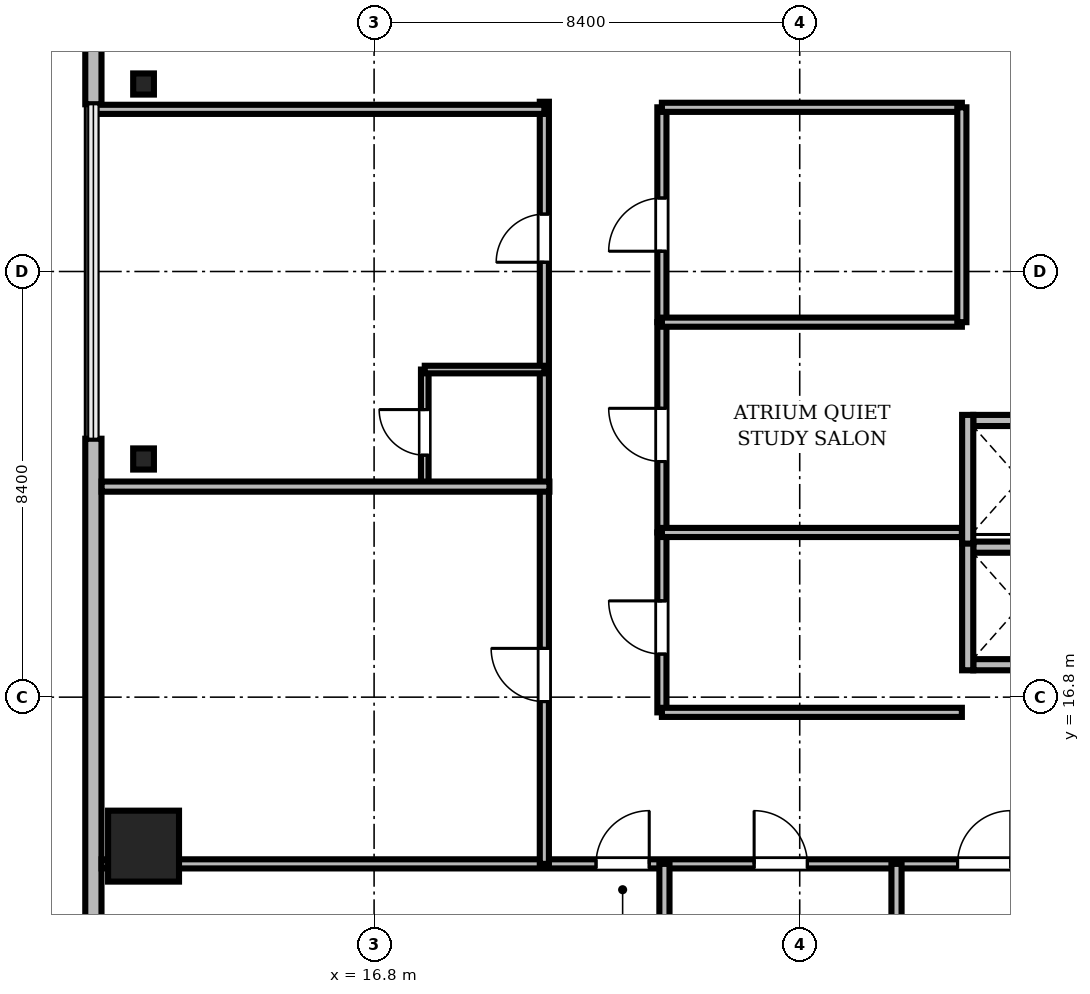
"""IFC4 building model, lengths in metres.
Left out: names, types, materials, properties, quantities, classifications, styles, units other than length and angle.
Written with IfcOpenShell. Run it as: python <this file> out.ifc"""

import sys

from ifc_helpers import new_model, si_unit, direction, frame, frame_2d, origin, origin_2d, place, context, subcontext, project, spatial, rectangle, i_section, extrude, source, transform, mapped, element, fill, save


model = new_model("IFC4")
c1 = context("Model", 3, precision=1e-05, world=origin(), true_north=direction((0.0, 1.0)))
c2 = subcontext(c1, "Body", "Model", "MODEL_VIEW")
j1 = project(units=[si_unit("LENGTHUNIT", "METRE"), si_unit("PLANEANGLEUNIT", "RADIAN")], contexts=[c1])
p1 = place(None, origin())
s1 = spatial("IfcSite", under=j1, at=p1, CompositionType="ELEMENT")
p2 = place(p1, origin())
s2 = spatial("IfcBuilding", under=s1, at=p2, CompositionType="ELEMENT")
p3 = place(p2, frame((0.0, 0.0, 184.8)))
s3 = spatial("IfcBuildingStorey", under=s2, at=p3, CompositionType="ELEMENT", Elevation=184.8)
m1 = source(origin(), c2, "Body", "SweptSolid", [
    extrude(rectangle(XDim=1.4, YDim=1.4, at=origin_2d()), origin(), (0.0, 0.0, 1.0), 3.53),
])
p4 = place(p3, frame((12.25, 13.86, 0.0), z_axis=(0.0, 0.0, 1.0), x_axis=(1.0, 0.0, 0.0)))
e1 = element("IfcColumn", 1, at=p4, inside=s3, PredefinedType="COLUMN", context=c2, shape_type="MappedRepresentation", body=[
    mapped(m1, transform((0.0, 0.0, 0.0), scale=1.0)),
])
m2 = source(origin(), c2, "Body", "SweptSolid", [
    extrude(i_section(OverallWidth=0.409, OverallDepth=0.417, WebThickness=0.021, FlangeThickness=0.033, FilletRadius=0.015, at=origin_2d()), origin(), (0.0, 0.0, 1.0), 3.53),
])
for number, where, z_axis, x_axis in (
    (2, (12.25, 28.9, 0.0), (0.0, 0.0, 1.0), (1.0, 0.0, 0.0)),
    (3, (12.25, 21.5, 0.0), (0.0, 0.0, 1.0), (1.0, 0.0, 0.0)),
):
    element("IfcColumn", number, at=place(p3, frame(where, z_axis=z_axis, x_axis=x_axis)), inside=s3, PredefinedType="COLUMN", context=c2, shape_type="MappedRepresentation", body=[
        mapped(m2, transform((0.0, 0.0, 0.0), scale=1.0)),
    ])
m3 = source(origin(), c2, "Body", "SweptSolid", [
    extrude(rectangle(XDim=15.6, YDim=0.32, at=frame_2d((7.8, 0.0))), origin(), (0.0, 0.0, 1.0), 3.53),
])
p5 = place(p3, frame((11.26, 44.1, 0.0), z_axis=(0.0, 0.0, 1.0), x_axis=(0.0, -1.0, 0.0)))
e4 = element("IfcWall", 4, at=p5, inside=s3, PredefinedType="SOLIDWALL", context=c2, shape_type="MappedRepresentation", body=[
    mapped(m3, transform((0.0, 0.0, 0.0), scale=1.0)),
])
m4 = source(origin(), c2, "Body", "SweptSolid", [
    extrude(rectangle(XDim=1.4, YDim=2.3, at=frame_2d((0.7, 1.15))), frame((0.0, 0.17, 0.0), z_axis=(0.0, -1.0, 0.0), x_axis=(1.0, 0.0, 0.0)), (0.0, 0.0, 1.0), 0.34),
])
p6 = place(p5, frame((9.61, 0.0, 0.0)))
e5 = element("IfcOpeningElement", 5, at=p6, cuts=e4, PredefinedType="OPENING", context=c2, shape_type="MappedRepresentation", body=[
    mapped(m4, transform((0.0, 0.0, 0.0), scale=1.0)),
])
m5 = source(origin(), c2, "Body", "SweptSolid", [
    extrude(rectangle(XDim=2.2, YDim=2.4, at=frame_2d((1.1, 1.2))), frame((0.0, 0.17, 0.0), z_axis=(0.0, -1.0, 0.0), x_axis=(1.0, 0.0, 0.0)), (0.0, 0.0, 1.0), 0.34),
])
p7 = place(p5, frame((3.005, 0.0, 0.72)))
e6 = element("IfcOpeningElement", 6, at=p7, cuts=e4, PredefinedType="OPENING", context=c2, shape_type="MappedRepresentation", body=[
    mapped(m5, transform((0.0, 0.0, 0.0), scale=1.0)),
])
m6 = source(origin(), c2, "Body", "SweptSolid", [
    extrude(rectangle(XDim=15.6, YDim=0.32, at=frame_2d((7.8, 0.0))), origin(), (0.0, 0.0, 1.0), 3.53),
])
p8 = place(p3, frame((11.26, 21.9, 0.0), z_axis=(0.0, 0.0, 1.0), x_axis=(0.0, -1.0, 0.0)))
e7 = element("IfcWall", 7, at=p8, inside=s3, PredefinedType="SOLIDWALL", context=c2, shape_type="MappedRepresentation", body=[
    mapped(m6, transform((0.0, 0.0, 0.0), scale=1.0)),
])
p9 = place(p8, frame((10.395, 0.0, 0.72)))
e8 = element("IfcOpeningElement", 8, at=p9, cuts=e7, PredefinedType="OPENING", context=c2, shape_type="MappedRepresentation", body=[
    mapped(m5, transform((0.0, 0.0, 0.0), scale=1.0)),
])
m7 = source(origin(), c2, "Body", "SweptSolid", [
    extrude(rectangle(XDim=1.85, YDim=0.22, at=frame_2d((0.925, 0.0))), origin(), (0.0, 0.0, 1.0), 2.972),
])
p10 = place(p3, frame((28.625, 17.44, 0.0), z_axis=(0.0, 0.0, 1.0), x_axis=(1.0, 0.0, 0.0)))
e9 = element("IfcWall", 9, at=p10, inside=s3, PredefinedType="SOLIDWALL", context=c2, shape_type="MappedRepresentation", body=[
    mapped(m7, transform((0.0, 0.0, 0.0), scale=1.0)),
])
m8 = source(origin(), c2, "Body", "SweptSolid", [
    extrude(rectangle(XDim=1.85, YDim=0.22, at=frame_2d((0.925, 0.0))), origin(), (0.0, 0.0, 1.0), 3.53),
])
p11 = place(p3, frame((28.625, 19.76, 0.0), z_axis=(0.0, 0.0, 1.0), x_axis=(1.0, 0.0, 0.0)))
e10 = element("IfcWall", 10, at=p11, inside=s3, PredefinedType="SOLIDWALL", context=c2, shape_type="MappedRepresentation", body=[
    mapped(m8, transform((0.0, 0.0, 0.0), scale=1.0)),
])
m9 = source(origin(), c2, "Body", "SweptSolid", [
    extrude(rectangle(XDim=2.54, YDim=0.22, at=frame_2d((1.27, 0.0))), origin(), (0.0, 0.0, 1.0), 2.972),
])
p12 = place(p3, frame((28.515, 17.33, 0.0), z_axis=(0.0, 0.0, 1.0), x_axis=(0.0, 1.0, 0.0)))
e11 = element("IfcWall", 11, at=p12, inside=s3, PredefinedType="SOLIDWALL", context=c2, shape_type="MappedRepresentation", body=[
    mapped(m9, transform((0.0, 0.0, 0.0), scale=1.0)),
])
p13 = place(p3, frame((28.625, 22.26, 0.0), z_axis=(0.0, 0.0, 1.0), x_axis=(1.0, 0.0, 0.0)))
e12 = element("IfcWall", 12, at=p13, inside=s3, PredefinedType="SOLIDWALL", context=c2, shape_type="MappedRepresentation", body=[
    mapped(m8, transform((0.0, 0.0, 0.0), scale=1.0)),
])
m10 = source(origin(), c2, "Body", "SweptSolid", [
    extrude(rectangle(XDim=2.54, YDim=0.22, at=frame_2d((1.27, 0.0))), origin(), (0.0, 0.0, 1.0), 3.53),
])
p14 = place(p3, frame((28.515, 19.83, 0.0), z_axis=(0.0, 0.0, 1.0), x_axis=(0.0, 1.0, 0.0)))
e13 = element("IfcWall", 13, at=p14, inside=s3, PredefinedType="SOLIDWALL", context=c2, shape_type="MappedRepresentation", body=[
    mapped(m10, transform((0.0, 0.0, 0.0), scale=1.0)),
])
m11 = source(origin(), c2, "Body", "SweptSolid", [
    extrude(rectangle(XDim=46.156, YDim=0.18, at=frame_2d((23.078, 0.0))), origin(), (0.0, 0.0, 1.0), 2.772),
])
p15 = place(p3, frame((11.422, 13.51, 0.0), z_axis=(0.0, 0.0, 1.0), x_axis=(1.0, 0.0, 0.0)))
e14 = element("IfcWall", 14, at=p15, inside=s3, PredefinedType="PARTITIONING", context=c2, shape_type="MappedRepresentation", body=[
    mapped(m11, transform((0.0, 0.0, 0.0), scale=1.0)),
])
m12 = source(origin(), c2, "Body", "SweptSolid", [
    extrude(rectangle(XDim=1.05, YDim=2.2, at=frame_2d((0.525, 1.1))), frame((0.0, 0.1, 0.0), z_axis=(0.0, -1.0, 0.0), x_axis=(1.0, 0.0, 0.0)), (0.0, 0.0, 1.0), 0.2),
])
p16 = place(p15, frame((9.758, 0.0, 0.0)))
e15 = element("IfcOpeningElement", 15, at=p16, cuts=e14, PredefinedType="OPENING", context=c2, shape_type="MappedRepresentation", body=[
    mapped(m12, transform((0.0, 0.0, 0.0), scale=1.0)),
])
p17 = place(p15, frame((12.878, 0.0, 0.0)))
e16 = element("IfcOpeningElement", 16, at=p17, cuts=e14, PredefinedType="OPENING", context=c2, shape_type="MappedRepresentation", body=[
    mapped(m12, transform((0.0, 0.0, 0.0), scale=1.0)),
])
p18 = place(p15, frame((16.893, 0.0, 0.0)))
e17 = element("IfcOpeningElement", 17, at=p18, cuts=e14, PredefinedType="OPENING", context=c2, shape_type="MappedRepresentation", body=[
    mapped(m12, transform((0.0, 0.0, 0.0), scale=1.0)),
])
p19 = place(p15, frame((20.344, 0.0, 0.0)))
e18 = element("IfcOpeningElement", 18, at=p19, cuts=e14, PredefinedType="OPENING", context=c2, shape_type="MappedRepresentation", body=[
    mapped(m12, transform((0.0, 0.0, 0.0), scale=1.0)),
])
p20 = place(p15, frame((24.008, 0.0, 0.0)))
e19 = element("IfcOpeningElement", 19, at=p20, cuts=e14, PredefinedType="OPENING", context=c2, shape_type="MappedRepresentation", body=[
    mapped(m12, transform((0.0, 0.0, 0.0), scale=1.0)),
])
p21 = place(p15, frame((28.055, 0.0, 0.0)))
e20 = element("IfcOpeningElement", 20, at=p21, cuts=e14, PredefinedType="OPENING", context=c2, shape_type="MappedRepresentation", body=[
    mapped(m12, transform((0.0, 0.0, 0.0), scale=1.0)),
])
m13 = source(origin(), c2, "Body", "SweptSolid", [
    extrude(rectangle(XDim=0.95, YDim=2.15, at=frame_2d((0.475, 1.075))), frame((0.0, 0.1, 0.0), z_axis=(0.0, -1.0, 0.0), x_axis=(1.0, 0.0, 0.0)), (0.0, 0.0, 1.0), 0.2),
])
p22 = place(p15, frame((34.246, 0.0, 0.0)))
e21 = element("IfcOpeningElement", 21, at=p22, cuts=e14, PredefinedType="OPENING", context=c2, shape_type="MappedRepresentation", body=[
    mapped(m13, transform((0.0, 0.0, 0.0), scale=1.0)),
])
p23 = place(p15, frame((37.498, 0.0, 0.0)))
e22 = element("IfcOpeningElement", 22, at=p23, cuts=e14, PredefinedType="OPENING", context=c2, shape_type="MappedRepresentation", body=[
    mapped(m12, transform((0.0, 0.0, 0.0), scale=1.0)),
])
m14 = source(origin(), c2, "Body", "SweptSolid", [
    extrude(rectangle(XDim=15.04, YDim=0.18, at=frame_2d((7.52, 0.0))), origin(), (0.0, 0.0, 1.0), 2.972),
])
p24 = place(p3, frame((20.16, 13.51, 0.0), z_axis=(0.0, 0.0, 1.0), x_axis=(0.0, 1.0, 0.0)))
e23 = element("IfcWall", 23, at=p24, inside=s3, PredefinedType="PARTITIONING", context=c2, shape_type="MappedRepresentation", body=[
    mapped(m14, transform((0.0, 0.0, 0.0), scale=1.0)),
])
p25 = place(p24, frame((3.202, 0.0, 0.0)))
e24 = element("IfcOpeningElement", 24, at=p25, cuts=e23, PredefinedType="OPENING", context=c2, shape_type="MappedRepresentation", body=[
    mapped(m12, transform((0.0, 0.0, 0.0), scale=1.0)),
])
p26 = place(p24, frame((11.873, 0.0, 0.0)))
e25 = element("IfcOpeningElement", 25, at=p26, cuts=e23, PredefinedType="OPENING", context=c2, shape_type="MappedRepresentation", body=[
    mapped(m13, transform((0.0, 0.0, 0.0), scale=1.0)),
])
m15 = source(origin(), c2, "Body", "SweptSolid", [
    extrude(rectangle(XDim=4.24, YDim=0.18, at=frame_2d((2.12, 0.0))), origin(), (0.0, 0.0, 1.0), 2.972),
])
p27 = place(p3, frame((22.48, 24.2, 0.0), z_axis=(0.0, 0.0, 1.0), x_axis=(0.0, 1.0, 0.0)))
e26 = element("IfcWall", 26, at=p27, inside=s3, PredefinedType="PARTITIONING", context=c2, shape_type="MappedRepresentation", body=[
    mapped(m15, transform((0.0, 0.0, 0.0), scale=1.0)),
])
p28 = place(p27, frame((1.4, 0.0, 0.0)))
e27 = element("IfcOpeningElement", 27, at=p28, cuts=e26, PredefinedType="OPENING", context=c2, shape_type="MappedRepresentation", body=[
    mapped(m12, transform((0.0, 0.0, 0.0), scale=1.0)),
])
m16 = source(origin(), c2, "Body", "SweptSolid", [
    extrude(rectangle(XDim=4.15, YDim=0.18, at=frame_2d((2.075, 0.0))), origin(), (0.0, 0.0, 1.0), 3.192),
])
p29 = place(p3, frame((22.48, 20.05, 0.0), z_axis=(0.0, 0.0, 1.0), x_axis=(0.0, 1.0, 0.0)))
e28 = element("IfcWall", 28, at=p29, inside=s3, PredefinedType="PARTITIONING", context=c2, shape_type="MappedRepresentation", body=[
    mapped(m16, transform((0.0, 0.0, 0.0), scale=1.0)),
])
p30 = place(p29, frame((1.4, 0.0, 0.0)))
e29 = element("IfcOpeningElement", 29, at=p30, cuts=e28, PredefinedType="OPENING", context=c2, shape_type="MappedRepresentation", body=[
    mapped(m12, transform((0.0, 0.0, 0.0), scale=1.0)),
])
m17 = source(origin(), c2, "Body", "SweptSolid", [
    extrude(rectangle(XDim=3.55, YDim=0.18, at=frame_2d((1.775, 0.0))), origin(), (0.0, 0.0, 1.0), 2.972),
])
p31 = place(p3, frame((22.48, 16.5, 0.0), z_axis=(0.0, 0.0, 1.0), x_axis=(0.0, 1.0, 0.0)))
e30 = element("IfcWall", 30, at=p31, inside=s3, PredefinedType="PARTITIONING", context=c2, shape_type="MappedRepresentation", body=[
    mapped(m17, transform((0.0, 0.0, 0.0), scale=1.0)),
])
p32 = place(p31, frame((1.15, 0.0, 0.0)))
e31 = element("IfcOpeningElement", 31, at=p32, cuts=e30, PredefinedType="OPENING", context=c2, shape_type="MappedRepresentation", body=[
    mapped(m12, transform((0.0, 0.0, 0.0), scale=1.0)),
])
m18 = source(origin(), c2, "Body", "SweptSolid", [
    extrude(rectangle(XDim=2.29, YDim=0.15, at=frame_2d((1.145, 0.0))), origin(), (0.0, 0.0, 1.0), 3.53),
])
p33 = place(p3, frame((17.8, 20.975, 0.0), z_axis=(0.0, 0.0, 1.0), x_axis=(0.0, 1.0, 0.0)))
e32 = element("IfcWall", 32, at=p33, inside=s3, PredefinedType="PARTITIONING", context=c2, shape_type="MappedRepresentation", body=[
    mapped(m18, transform((0.0, 0.0, 0.0), scale=1.0)),
])
m19 = source(origin(), c2, "Body", "SweptSolid", [
    extrude(rectangle(XDim=0.9, YDim=2.1, at=frame_2d((0.45, 1.05))), frame((0.0, 0.085, 0.0), z_axis=(0.0, -1.0, 0.0), x_axis=(1.0, 0.0, 0.0)), (0.0, 0.0, 1.0), 0.17),
])
p34 = place(p33, frame((0.6, 0.0, 0.0)))
e33 = element("IfcOpeningElement", 33, at=p34, cuts=e32, PredefinedType="OPENING", context=c2, shape_type="MappedRepresentation", body=[
    mapped(m19, transform((0.0, 0.0, 0.0), scale=1.0)),
])
m20 = source(origin(), c2, "Body", "SweptSolid", [
    extrude(rectangle(XDim=11.388, YDim=0.2, at=frame_2d((5.694, 0.0))), origin(), (0.0, 0.0, 1.0), 2.772),
])
for number, where, z_axis, x_axis in (
    (34, (22.53, 2.122, 0.0), (0.0, 0.0, 1.0), (0.0, 1.0, 0.0)),
    (35, (27.11, 2.122, 0.0), (0.0, 0.0, 1.0), (0.0, 1.0, 0.0)),
):
    element("IfcWall", number, at=place(p3, frame(where, z_axis=z_axis, x_axis=x_axis)), inside=s3, PredefinedType="PARTITIONING", context=c2, shape_type="MappedRepresentation", body=[
        mapped(m20, transform((0.0, 0.0, 0.0), scale=1.0)),
    ])
m21 = source(origin(), c2, "Body", "SweptSolid", [
    extrude(rectangle(XDim=8.838, YDim=0.2, at=frame_2d((4.419, 0.0))), origin(), (0.0, 0.0, 1.0), 2.772),
])
p35 = place(p3, frame((11.422, 20.955, 0.0), z_axis=(0.0, 0.0, 1.0), x_axis=(1.0, 0.0, 0.0)))
e36 = element("IfcWall", 36, at=p35, inside=s3, PredefinedType="PARTITIONING", context=c2, shape_type="MappedRepresentation", body=[
    mapped(m21, transform((0.0, 0.0, 0.0), scale=1.0)),
])
m22 = source(origin(), c2, "Body", "SweptSolid", [
    extrude(rectangle(XDim=8.93, YDim=0.18, at=frame_2d((4.465, 0.0))), origin(), (0.0, 0.0, 1.0), 2.772),
])
p36 = place(p3, frame((11.23, 28.4, 0.0), z_axis=(0.0, 0.0, 1.0), x_axis=(1.0, 0.0, 0.0)))
e37 = element("IfcWall", 37, at=p36, inside=s3, PredefinedType="PARTITIONING", context=c2, shape_type="MappedRepresentation", body=[
    mapped(m22, transform((0.0, 0.0, 0.0), scale=1.0)),
])
m23 = source(origin(), c2, "Body", "SweptSolid", [
    extrude(rectangle(XDim=5.92, YDim=0.18, at=frame_2d((2.96, 0.0))), origin(), (0.0, 0.0, 1.0), 3.53),
])
for number, where, z_axis, x_axis in (
    (38, (22.48, 16.5, 0.0), (0.0, 0.0, 1.0), (1.0, 0.0, 0.0)),
    (39, (22.48, 20.05, 0.0), (0.0, 0.0, 1.0), (1.0, 0.0, 0.0)),
    (40, (22.48, 24.2, 0.0), (0.0, 0.0, 1.0), (1.0, 0.0, 0.0)),
    (41, (22.48, 28.44, 0.0), (0.0, 0.0, 1.0), (1.0, 0.0, 0.0)),
):
    element("IfcWall", number, at=place(p3, frame(where, z_axis=z_axis, x_axis=x_axis)), inside=s3, PredefinedType="PARTITIONING", context=c2, shape_type="MappedRepresentation", body=[
        mapped(m23, transform((0.0, 0.0, 0.0), scale=1.0)),
    ])
p37 = place(p3, frame((28.4, 24.2, 0.0), z_axis=(0.0, 0.0, 1.0), x_axis=(0.0, 1.0, 0.0)))
e42 = element("IfcWall", 42, at=p37, inside=s3, PredefinedType="PARTITIONING", context=c2, shape_type="MappedRepresentation", body=[
    mapped(m15, transform((0.0, 0.0, 0.0), scale=1.0)),
])
m24 = source(origin(), c2, "Body", "SweptSolid", [
    extrude(rectangle(XDim=2.36, YDim=0.15, at=frame_2d((1.18, 0.0))), origin(), (0.0, 0.0, 1.0), 3.53),
])
p38 = place(p3, frame((17.8, 23.265, 0.0), z_axis=(0.0, 0.0, 1.0), x_axis=(1.0, 0.0, 0.0)))
e43 = element("IfcWall", 43, at=p38, inside=s3, PredefinedType="PARTITIONING", context=c2, shape_type="MappedRepresentation", body=[
    mapped(m24, transform((0.0, 0.0, 0.0), scale=1.0)),
])
m25 = source(origin(), c2, "Body", "SweptSolid", [
    extrude(rectangle(XDim=1.05, YDim=2.2, at=frame_2d((0.525, 1.1))), frame((0.0, 0.025, 0.0), z_axis=(0.0, -1.0, 0.0), x_axis=(1.0, 0.0, 0.0)), (0.0, 0.0, 1.0), 0.05),
])
p39 = place(p16, origin())
e44 = element("IfcDoor", 44, at=p39, inside=s3, OperationType="SINGLE_SWING_RIGHT", PredefinedType="DOOR", context=c2, shape_type="MappedRepresentation", body=[
    mapped(m25, transform((0.0, 0.0, 0.0), scale=1.0)),
])
fill(e15, e44)
p40 = place(p17, origin())
e45 = element("IfcDoor", 45, at=p40, inside=s3, OperationType="SINGLE_SWING_LEFT", PredefinedType="DOOR", context=c2, shape_type="MappedRepresentation", body=[
    mapped(m25, transform((0.0, 0.0, 0.0), scale=1.0)),
])
fill(e16, e45)
p41 = place(p18, origin())
e46 = element("IfcDoor", 46, at=p41, inside=s3, OperationType="SINGLE_SWING_RIGHT", PredefinedType="DOOR", context=c2, shape_type="MappedRepresentation", body=[
    mapped(m25, transform((0.0, 0.0, 0.0), scale=1.0)),
])
fill(e17, e46)
p42 = place(p25, origin())
e47 = element("IfcDoor", 47, at=p42, inside=s3, OperationType="SINGLE_SWING_RIGHT", PredefinedType="DOOR", context=c2, shape_type="MappedRepresentation", body=[
    mapped(m25, transform((0.0, 0.0, 0.0), scale=1.0)),
])
fill(e24, e47)
m26 = source(origin(), c2, "Body", "SweptSolid", [
    extrude(rectangle(XDim=0.95, YDim=2.15, at=frame_2d((0.475, 1.075))), frame((0.0, 0.025, 0.0), z_axis=(0.0, -1.0, 0.0), x_axis=(1.0, 0.0, 0.0)), (0.0, 0.0, 1.0), 0.05),
])
p43 = place(p26, origin())
e48 = element("IfcDoor", 48, at=p43, inside=s3, OperationType="SINGLE_SWING_LEFT", PredefinedType="DOOR", context=c2, shape_type="MappedRepresentation", body=[
    mapped(m26, transform((0.0, 0.0, 0.0), scale=1.0)),
])
fill(e25, e48)
p44 = place(p28, origin())
e49 = element("IfcDoor", 49, at=p44, inside=s3, OperationType="SINGLE_SWING_LEFT", PredefinedType="DOOR", context=c2, shape_type="MappedRepresentation", body=[
    mapped(m25, transform((0.0, 0.0, 0.0), scale=1.0)),
])
fill(e27, e49)
p45 = place(p30, origin())
e50 = element("IfcDoor", 50, at=p45, inside=s3, OperationType="SINGLE_SWING_RIGHT", PredefinedType="DOOR", context=c2, shape_type="MappedRepresentation", body=[
    mapped(m25, transform((0.0, 0.0, 0.0), scale=1.0)),
])
fill(e29, e50)
p46 = place(p32, origin())
e51 = element("IfcDoor", 51, at=p46, inside=s3, OperationType="SINGLE_SWING_RIGHT", PredefinedType="DOOR", context=c2, shape_type="MappedRepresentation", body=[
    mapped(m25, transform((0.0, 0.0, 0.0), scale=1.0)),
])
fill(e31, e51)
m27 = source(origin(), c2, "Body", "SweptSolid", [
    extrude(rectangle(XDim=0.9, YDim=2.1, at=frame_2d((0.45, 1.05))), frame((0.0, 0.025, 0.0), z_axis=(0.0, -1.0, 0.0), x_axis=(1.0, 0.0, 0.0)), (0.0, 0.0, 1.0), 0.05),
])
p47 = place(p34, origin())
e52 = element("IfcDoor", 52, at=p47, inside=s3, OperationType="SINGLE_SWING_RIGHT", PredefinedType="DOOR", context=c2, shape_type="MappedRepresentation", body=[
    mapped(m27, transform((0.0, 0.0, 0.0), scale=1.0)),
])
fill(e33, e52)
save(model, sys.argv[1])
